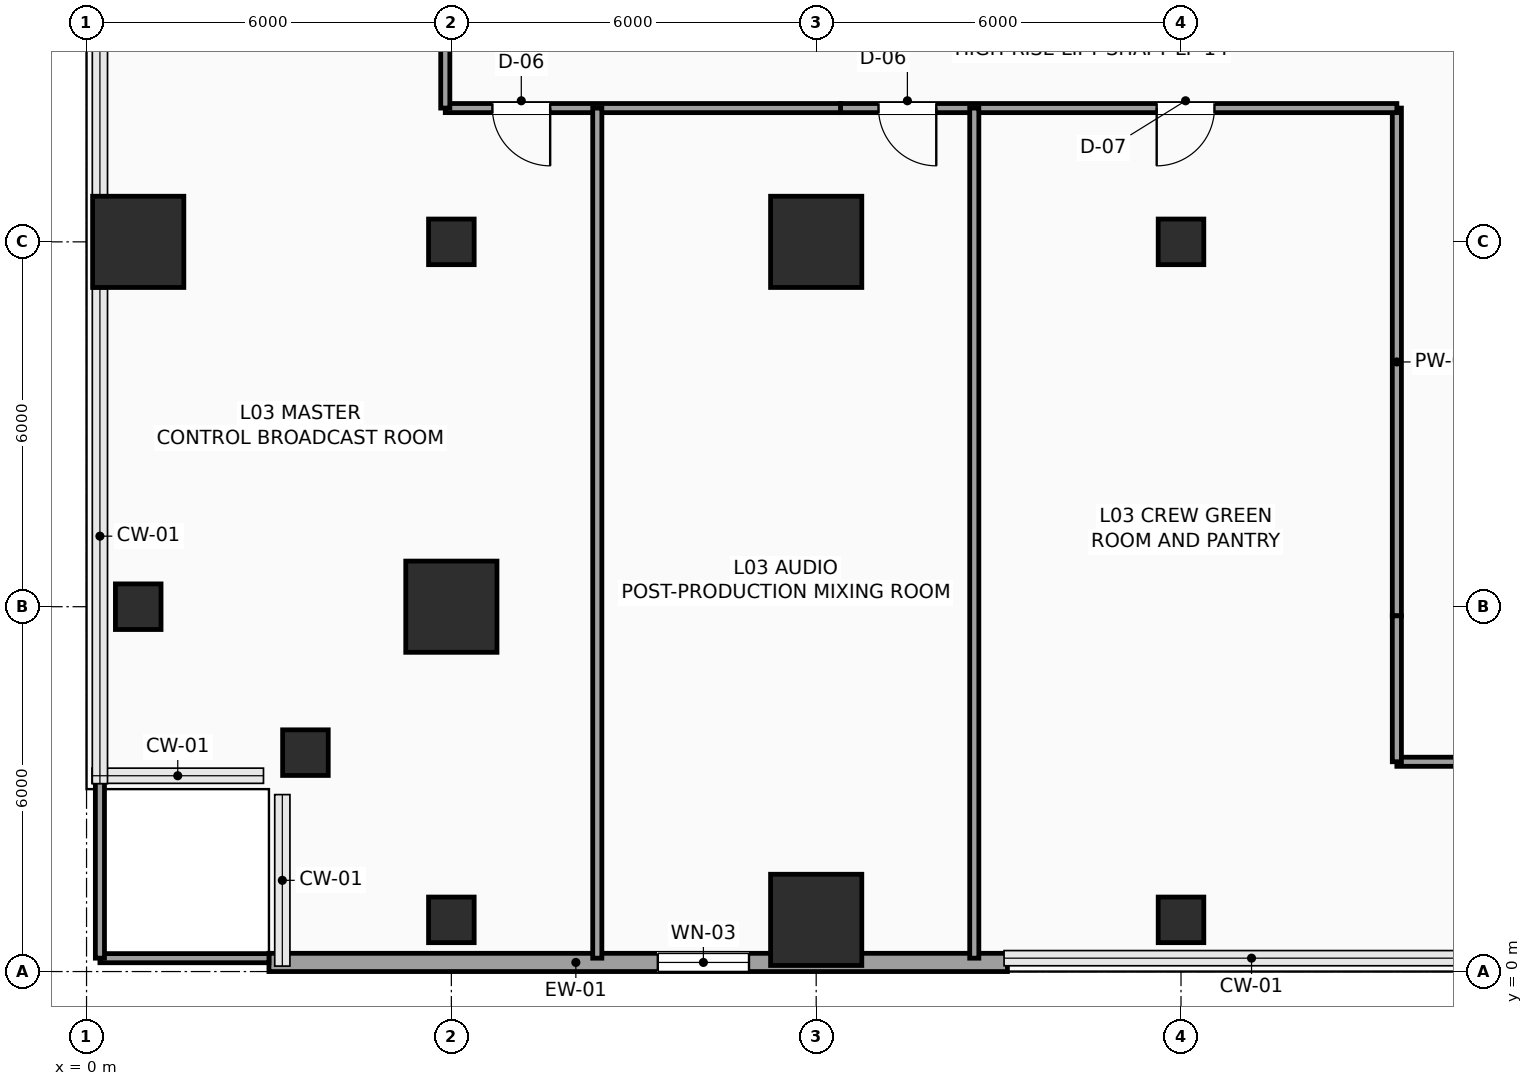
"""IFC4 building model, lengths in metres.
Left out: names, types, materials, properties, quantities, classifications, styles, units other than length and angle.
Written with IfcOpenShell. Run it as: python <this file> out.ifc"""

import sys

from ifc_helpers import new_model, si_unit, direction, frame, frame_2d, origin, origin_2d, place, context, subcontext, project, spatial, rectangle, hollow_rectangle, extrude, element, fill, save


model = new_model("IFC4")
c1 = context("Model", 3, precision=1e-05, world=origin(), true_north=direction((0.0, 1.0)))
c2 = subcontext(c1, "Body", "Model", "MODEL_VIEW")
j1 = project(units=[si_unit("LENGTHUNIT", "METRE"), si_unit("PLANEANGLEUNIT", "RADIAN")], contexts=[c1])
p1 = place(None, origin())
s1 = spatial("IfcSite", under=j1, at=p1, CompositionType="ELEMENT")
p2 = place(p1, origin())
s2 = spatial("IfcBuilding", under=s1, at=p2, CompositionType="ELEMENT")
p3 = place(p2, frame((0.0, 0.0, 16.5)))
s3 = spatial("IfcBuildingStorey", under=s2, at=p3, CompositionType="ELEMENT", Elevation=16.5)
for number, where, z_axis, x_axis in (
    (1, (3.6, 3.6, 0.0), (0.0, 0.0, 1.0), (1.0, 0.0, 0.0)),
    (2, (0.85, 6.0, 0.0), (0.0, 0.0, 1.0), (1.0, 0.0, 0.0)),
):
    element("IfcColumn", number, at=place(p3, frame(where, z_axis=z_axis, x_axis=x_axis)), inside=s3, PredefinedType="COLUMN", context=c2, shape_type="SweptSolid", body=[
        extrude(hollow_rectangle(XDim=0.75, YDim=0.75, WallThickness=0.035, InnerFilletRadius=0.035, OuterFilletRadius=0.05, at=origin_2d()), origin(), (0.0, 0.0, 1.0), 5.4),
    ])
p4 = place(p3, frame((0.85, 12.0, 0.0), z_axis=(0.0, 0.0, 1.0), x_axis=(1.0, 0.0, 0.0)))
e3 = element("IfcColumn", 3, at=p4, inside=s3, PredefinedType="COLUMN", context=c2, shape_type="SweptSolid", body=[
    extrude(rectangle(XDim=1.5, YDim=1.5, at=origin_2d()), origin(), (0.0, 0.0, 1.0), 5.4),
])
p5 = place(p3, frame((6.0, 0.85, 0.0), z_axis=(0.0, 0.0, 1.0), x_axis=(1.0, 0.0, 0.0)))
e4 = element("IfcColumn", 4, at=p5, inside=s3, PredefinedType="COLUMN", context=c2, shape_type="SweptSolid", body=[
    extrude(hollow_rectangle(XDim=0.75, YDim=0.75, WallThickness=0.035, InnerFilletRadius=0.035, OuterFilletRadius=0.05, at=origin_2d()), origin(), (0.0, 0.0, 1.0), 5.4),
])
p6 = place(p3, frame((6.0, 6.0, 0.0), z_axis=(0.0, 0.0, 1.0), x_axis=(1.0, 0.0, 0.0)))
e5 = element("IfcColumn", 5, at=p6, inside=s3, PredefinedType="COLUMN", context=c2, shape_type="SweptSolid", body=[
    extrude(rectangle(XDim=1.5, YDim=1.5, at=origin_2d()), origin(), (0.0, 0.0, 1.0), 5.4),
])
p7 = place(p3, frame((6.0, 12.0, 0.0), z_axis=(0.0, 0.0, 1.0), x_axis=(1.0, 0.0, 0.0)))
e6 = element("IfcColumn", 6, at=p7, inside=s3, PredefinedType="COLUMN", context=c2, shape_type="SweptSolid", body=[
    extrude(hollow_rectangle(XDim=0.75, YDim=0.75, WallThickness=0.035, InnerFilletRadius=0.035, OuterFilletRadius=0.05, at=origin_2d()), origin(), (0.0, 0.0, 1.0), 5.4),
])
for number, where, z_axis, x_axis in (
    (7, (12.0, 0.85, 0.0), (0.0, 0.0, 1.0), (1.0, 0.0, 0.0)),
    (8, (12.0, 12.0, 0.0), (0.0, 0.0, 1.0), (1.0, 0.0, 0.0)),
):
    element("IfcColumn", number, at=place(p3, frame(where, z_axis=z_axis, x_axis=x_axis)), inside=s3, PredefinedType="COLUMN", context=c2, shape_type="SweptSolid", body=[
        extrude(rectangle(XDim=1.5, YDim=1.5, at=origin_2d()), origin(), (0.0, 0.0, 1.0), 5.4),
    ])
for number, where, z_axis, x_axis in (
    (9, (18.0, 0.85, 0.0), (0.0, 0.0, 1.0), (1.0, 0.0, 0.0)),
    (10, (18.0, 12.0, 0.0), (0.0, 0.0, 1.0), (1.0, 0.0, 0.0)),
):
    element("IfcColumn", number, at=place(p3, frame(where, z_axis=z_axis, x_axis=x_axis)), inside=s3, PredefinedType="COLUMN", context=c2, shape_type="SweptSolid", body=[
        extrude(hollow_rectangle(XDim=0.75, YDim=0.75, WallThickness=0.035, InnerFilletRadius=0.035, OuterFilletRadius=0.05, at=origin_2d()), origin(), (0.0, 0.0, 1.0), 5.4),
    ])
p8 = place(p3, frame((15.145, 0.15, 0.0), z_axis=(0.0, 0.0, 1.0), x_axis=(-1.0, 0.0, 0.0)))
e11 = element("IfcWall", 11, at=p8, inside=s3, PredefinedType="SOLIDWALL", context=c2, shape_type="SweptSolid", body=[
    extrude(rectangle(XDim=12.145, YDim=0.3, at=frame_2d((6.073, 0.0))), origin(), (0.0, 0.0, 1.0), 5.125),
])
p9 = place(p8, frame((4.25, 0.0, 1.0)))
e12 = element("IfcOpeningElement", 12, at=p9, cuts=e11, PredefinedType="OPENING", context=c2, shape_type="SweptSolid", body=[
    extrude(rectangle(XDim=1.5, YDim=1.8, at=frame_2d((0.75, 0.9))), frame((0.0, 0.16, 0.0), z_axis=(0.0, -1.0, 0.0), x_axis=(1.0, 0.0, 0.0)), (0.0, 0.0, 1.0), 0.32),
])
p10 = place(p3, frame((21.55, 5.85, 0.0), z_axis=(0.0, 0.0, 1.0), x_axis=(0.0, 1.0, 0.0)))
e13 = element("IfcWall", 13, at=p10, inside=s3, PredefinedType="PARTITIONING", context=c2, shape_type="SweptSolid", body=[
    extrude(rectangle(XDim=8.35, YDim=0.15, at=frame_2d((4.175, 0.0))), origin(), (0.0, 0.0, 1.0), 5.125),
])
p11 = place(p3, frame((21.55, 14.2, 0.0), z_axis=(0.0, 0.0, 1.0), x_axis=(-1.0, 0.0, 0.0)))
e14 = element("IfcWall", 14, at=p11, inside=s3, PredefinedType="PARTITIONING", context=c2, shape_type="SweptSolid", body=[
    extrude(rectangle(XDim=9.15, YDim=0.15, at=frame_2d((4.575, 0.0))), origin(), (0.0, 0.0, 1.0), 5.125),
])
p12 = place(p11, frame((7.575, 0.0, 0.0)))
e15 = element("IfcOpeningElement", 15, at=p12, cuts=e14, PredefinedType="OPENING", context=c2, shape_type="SweptSolid", body=[
    extrude(rectangle(XDim=0.95, YDim=2.15, at=frame_2d((0.475, 1.075))), frame((0.0, 0.085, 0.0), z_axis=(0.0, -1.0, 0.0), x_axis=(1.0, 0.0, 0.0)), (0.0, 0.0, 1.0), 0.17),
])
p13 = place(p11, frame((3.0, 0.0, 0.0)))
e16 = element("IfcOpeningElement", 16, at=p13, cuts=e14, PredefinedType="OPENING", context=c2, shape_type="SweptSolid", body=[
    extrude(rectangle(XDim=0.95, YDim=2.15, at=frame_2d((0.475, 1.075))), frame((0.0, 0.085, 0.0), z_axis=(0.0, -1.0, 0.0), x_axis=(1.0, 0.0, 0.0)), (0.0, 0.0, 1.0), 0.17),
])
p14 = place(p3, frame((12.4, 14.2, 0.0), z_axis=(0.0, 0.0, 1.0), x_axis=(-1.0, 0.0, 0.0)))
e17 = element("IfcWall", 17, at=p14, inside=s3, PredefinedType="PARTITIONING", context=c2, shape_type="SweptSolid", body=[
    extrude(rectangle(XDim=6.5, YDim=0.15, at=frame_2d((3.25, 0.0))), origin(), (0.0, 0.0, 1.0), 5.125),
])
p15 = place(p14, frame((4.775, 0.0, 0.0)))
e18 = element("IfcOpeningElement", 18, at=p15, cuts=e17, PredefinedType="OPENING", context=c2, shape_type="SweptSolid", body=[
    extrude(rectangle(XDim=0.95, YDim=2.15, at=frame_2d((0.475, 1.075))), frame((0.0, 0.085, 0.0), z_axis=(0.0, -1.0, 0.0), x_axis=(1.0, 0.0, 0.0)), (0.0, 0.0, 1.0), 0.17),
])
p16 = place(p3, frame((5.9, 14.2, 0.0), z_axis=(0.0, 0.0, 1.0), x_axis=(0.0, 1.0, 0.0)))
e19 = element("IfcWall", 19, at=p16, inside=s3, PredefinedType="PARTITIONING", context=c2, shape_type="SweptSolid", body=[
    extrude(rectangle(XDim=2.35, YDim=0.15, at=frame_2d((1.175, 0.0))), origin(), (0.0, 0.0, 1.0), 4.467),
])
p17 = place(p3, frame((23.98, 3.45, 0.0), z_axis=(0.0, 0.0, 1.0), x_axis=(-1.0, 0.0, 0.0)))
e20 = element("IfcWall", 20, at=p17, inside=s3, PredefinedType="PARTITIONING", context=c2, shape_type="SweptSolid", body=[
    extrude(rectangle(XDim=2.43, YDim=0.15, at=frame_2d((1.215, 0.0))), origin(), (0.0, 0.0, 1.0), 4.517),
])
p18 = place(p3, frame((21.55, 3.45, 0.0), z_axis=(0.0, 0.0, 1.0), x_axis=(0.0, 1.0, 0.0)))
e21 = element("IfcWall", 21, at=p18, inside=s3, PredefinedType="PARTITIONING", context=c2, shape_type="SweptSolid", body=[
    extrude(rectangle(XDim=2.4, YDim=0.15, at=frame_2d((1.2, 0.0))), origin(), (0.0, 0.0, 1.0), 5.125),
])
p19 = place(p3, frame((0.22, 0.22, 0.0), z_axis=(0.0, 0.0, 1.0), x_axis=(1.0, 0.0, 0.0)))
e22 = element("IfcWall", 22, at=p19, inside=s3, PredefinedType="PARTITIONING", context=c2, shape_type="SweptSolid", body=[
    extrude(rectangle(XDim=2.78, YDim=0.15, at=frame_2d((1.39, 0.0))), origin(), (0.0, 0.0, 1.0), 5.125),
])
for number, where, z_axis, x_axis in (
    (23, (0.22, 0.22, 0.0), (0.0, 0.0, 1.0), (0.0, 1.0, 0.0)),
    (24, (8.4, 0.22, 0.0), (0.0, 0.0, 1.0), (0.0, 1.0, 0.0)),
    (25, (14.6, 0.22, 0.0), (0.0, 0.0, 1.0), (0.0, 1.0, 0.0)),
):
    element("IfcWall", number, at=place(p3, frame(where, z_axis=z_axis, x_axis=x_axis)), inside=s3, PredefinedType="PARTITIONING", context=c2, shape_type="SweptSolid", body=[
        extrude(rectangle(XDim=13.98, YDim=0.15, at=frame_2d((6.99, 0.0))), origin(), (0.0, 0.0, 1.0), 5.125),
    ])
p20 = place(p9, origin())
e26 = element("IfcWindow", 26, at=p20, inside=s3, PartitioningType="SINGLE_PANEL", PredefinedType="WINDOW", context=c2, shape_type="SweptSolid", body=[
    extrude(rectangle(XDim=1.5, YDim=1.8, at=frame_2d((0.75, 0.9))), frame((0.0, 0.03, 0.0), z_axis=(0.0, -1.0, 0.0), x_axis=(1.0, 0.0, 0.0)), (0.0, 0.0, 1.0), 0.06),
])
fill(e12, e26)
p21 = place(p12, origin())
e27 = element("IfcDoor", 27, at=p21, inside=s3, OperationType="SINGLE_SWING_LEFT", PredefinedType="DOOR", context=c2, shape_type="SweptSolid", body=[
    extrude(rectangle(XDim=0.95, YDim=2.15, at=frame_2d((0.475, 1.075))), frame((0.0, 0.025, 0.0), z_axis=(0.0, -1.0, 0.0), x_axis=(1.0, 0.0, 0.0)), (0.0, 0.0, 1.0), 0.05),
])
fill(e15, e27)
p22 = place(p13, origin())
e28 = element("IfcDoor", 28, at=p22, inside=s3, OperationType="SINGLE_SWING_RIGHT", PredefinedType="DOOR", context=c2, shape_type="SweptSolid", body=[
    extrude(rectangle(XDim=0.95, YDim=2.15, at=frame_2d((0.475, 1.075))), frame((0.0, 0.025, 0.0), z_axis=(0.0, -1.0, 0.0), x_axis=(1.0, 0.0, 0.0)), (0.0, 0.0, 1.0), 0.05),
])
fill(e16, e28)
p23 = place(p15, origin())
e29 = element("IfcDoor", 29, at=p23, inside=s3, OperationType="SINGLE_SWING_LEFT", PredefinedType="DOOR", context=c2, shape_type="SweptSolid", body=[
    extrude(rectangle(XDim=0.95, YDim=2.15, at=frame_2d((0.475, 1.075))), frame((0.0, 0.025, 0.0), z_axis=(0.0, -1.0, 0.0), x_axis=(1.0, 0.0, 0.0)), (0.0, 0.0, 1.0), 0.05),
])
fill(e18, e29)
save(model, sys.argv[1])
